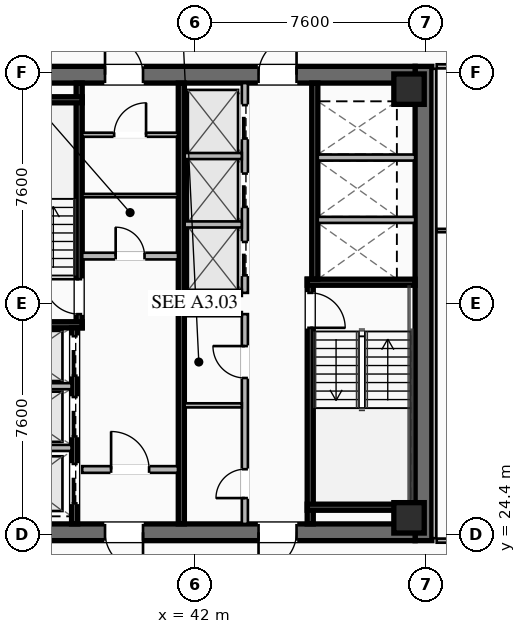
"""IFC4 building model, lengths in metres.
Left out: names, types, materials, properties, quantities, classifications, styles, units other than length and angle.
Written with IfcOpenShell. Run it as: python <this file> out.ifc"""

import sys

from ifc_helpers import new_model, si_unit, direction, frame, frame_2d, origin, origin_2d, place, context, subcontext, project, spatial, rectangle, hollow_rectangle, extrude, element, fill, save


model = new_model("IFC4")
c1 = context("Model", 3, precision=1e-05, world=origin(), true_north=direction((0.0, 1.0)))
c2 = subcontext(c1, "Body", "Model", "MODEL_VIEW")
j1 = project(units=[si_unit("LENGTHUNIT", "METRE"), si_unit("PLANEANGLEUNIT", "RADIAN")], contexts=[c1])
p1 = place(None, origin())
s1 = spatial("IfcSite", under=j1, at=p1, CompositionType="ELEMENT")
p2 = place(p1, origin())
s2 = spatial("IfcBuilding", under=s1, at=p2, CompositionType="ELEMENT")
p3 = place(p2, frame((0.0, 0.0, 171.2)))
s3 = spatial("IfcBuildingStorey", under=s2, at=p3, CompositionType="ELEMENT", Elevation=171.2)
p4 = place(p3, frame((49.525, 39.8, 0.0), z_axis=(0.0, 0.0, 1.0), x_axis=(0.0, -1.0, 0.0)))
e1 = element("IfcWall", 1, at=p4, inside=s3, PredefinedType="SHEAR", context=c2, shape_type="SweptSolid", body=[
    extrude(rectangle(XDim=15.6, YDim=0.55, at=frame_2d((7.8, 0.0))), origin(), (0.0, 0.0, 1.0), 3.55),
])
p5 = place(p3, frame((49.25, 24.475, 0.0), z_axis=(0.0, 0.0, 1.0), x_axis=(-1.0, 0.0, 0.0)))
e2 = element("IfcWall", 2, at=p5, inside=s3, PredefinedType="SHEAR", context=c2, shape_type="SweptSolid", body=[
    extrude(rectangle(XDim=14.5, YDim=0.55, at=frame_2d((7.25, 0.0))), origin(), (0.0, 0.0, 1.0), 3.55),
])
p6 = place(p5, frame((8.95, 0.0, 0.0)))
e3 = element("IfcOpeningElement", 3, at=p6, cuts=e2, PredefinedType="OPENING", context=c2, shape_type="SweptSolid", body=[
    extrude(rectangle(XDim=1.25, YDim=2.25, at=frame_2d((0.625, 1.125))), frame((0.0, 0.285, 0.0), z_axis=(0.0, -1.0, 0.0), x_axis=(1.0, 0.0, 0.0)), (0.0, 0.0, 1.0), 0.57),
])
p7 = place(p5, frame((3.9, 0.0, 0.0)))
e4 = element("IfcOpeningElement", 4, at=p7, cuts=e2, PredefinedType="OPENING", context=c2, shape_type="SweptSolid", body=[
    extrude(rectangle(XDim=1.25, YDim=2.25, at=frame_2d((0.625, 1.125))), frame((0.0, 0.285, 0.0), z_axis=(0.0, -1.0, 0.0), x_axis=(1.0, 0.0, 0.0)), (0.0, 0.0, 1.0), 0.57),
])
p8 = place(p3, frame((34.75, 39.525, 0.0), z_axis=(0.0, 0.0, 1.0), x_axis=(1.0, 0.0, 0.0)))
e5 = element("IfcWall", 5, at=p8, inside=s3, PredefinedType="SHEAR", context=c2, shape_type="SweptSolid", body=[
    extrude(rectangle(XDim=14.5, YDim=0.55, at=frame_2d((7.25, 0.0))), origin(), (0.0, 0.0, 1.0), 3.55),
])
p9 = place(p8, frame((4.3, 0.0, 0.0)))
e6 = element("IfcOpeningElement", 6, at=p9, cuts=e5, PredefinedType="OPENING", context=c2, shape_type="SweptSolid", body=[
    extrude(rectangle(XDim=1.25, YDim=2.25, at=frame_2d((0.625, 1.125))), frame((0.0, 0.285, 0.0), z_axis=(0.0, -1.0, 0.0), x_axis=(1.0, 0.0, 0.0)), (0.0, 0.0, 1.0), 0.57),
])
p10 = place(p8, frame((9.35, 0.0, 0.0)))
e7 = element("IfcOpeningElement", 7, at=p10, cuts=e5, PredefinedType="OPENING", context=c2, shape_type="SweptSolid", body=[
    extrude(rectangle(XDim=1.25, YDim=2.25, at=frame_2d((0.625, 1.125))), frame((0.0, 0.285, 0.0), z_axis=(0.0, -1.0, 0.0), x_axis=(1.0, 0.0, 0.0)), (0.0, 0.0, 1.0), 0.57),
])
for number, where, z_axis, x_axis in (
    (8, (49.05, 24.95, 0.0), (0.0, 0.0, 1.0), (1.0, 0.0, 0.0)),
    (9, (49.05, 39.05, 0.0), (0.0, 0.0, 1.0), (1.0, 0.0, 0.0)),
):
    element("IfcColumn", number, at=place(p3, frame(where, z_axis=z_axis, x_axis=x_axis)), inside=s3, PredefinedType="COLUMN", context=c2, shape_type="SweptSolid", body=[
        extrude(hollow_rectangle(XDim=1.0, YDim=1.0, WallThickness=0.04, at=origin_2d()), origin(), (0.0, 0.0, 1.0), 3.37),
    ])
p11 = place(p3, frame((38.2, 31.2, 0.0), z_axis=(0.0, 0.0, 1.0), x_axis=(0.0, 1.0, 0.0)))
e10 = element("IfcWall", 10, at=p11, inside=s3, PredefinedType="SHEAR", context=c2, shape_type="SweptSolid", body=[
    extrude(rectangle(XDim=8.05, YDim=0.2, at=frame_2d((4.025, 0.0))), origin(), (0.0, 0.0, 1.0), 3.37),
])
p12 = place(p11, frame((0.45, 0.0, 0.0)))
e11 = element("IfcOpeningElement", 11, at=p12, cuts=e10, PredefinedType="OPENING", context=c2, shape_type="SweptSolid", body=[
    extrude(rectangle(XDim=1.15, YDim=2.2, at=frame_2d((0.575, 1.1))), frame((0.0, 0.11, 0.0), z_axis=(0.0, -1.0, 0.0), x_axis=(1.0, 0.0, 0.0)), (0.0, 0.0, 1.0), 0.22),
])
for number, where, z_axis, x_axis in (
    (12, (34.75, 31.3, 0.0), (0.0, 0.0, 1.0), (1.0, 0.0, 0.0)),
    (13, (34.75, 38.7, 0.0), (0.0, 0.0, 1.0), (1.0, 0.0, 0.0)),
):
    element("IfcWall", number, at=place(p3, frame(where, z_axis=z_axis, x_axis=x_axis)), inside=s3, PredefinedType="SHEAR", context=c2, shape_type="SweptSolid", body=[
        extrude(rectangle(XDim=3.55, YDim=0.2, at=frame_2d((1.775, 0.0))), origin(), (0.0, 0.0, 1.0), 3.37),
    ])
p13 = place(p3, frame((45.8, 32.8, 0.0), z_axis=(0.0, 0.0, 1.0), x_axis=(0.0, -1.0, 0.0)))
e14 = element("IfcWall", 14, at=p13, inside=s3, PredefinedType="SHEAR", context=c2, shape_type="SweptSolid", body=[
    extrude(rectangle(XDim=8.05, YDim=0.2, at=frame_2d((4.025, 0.0))), origin(), (0.0, 0.0, 1.0), 3.37),
])
p14 = place(p13, frame((0.45, 0.0, 0.0)))
e15 = element("IfcOpeningElement", 15, at=p14, cuts=e14, PredefinedType="OPENING", context=c2, shape_type="SweptSolid", body=[
    extrude(rectangle(XDim=1.15, YDim=2.2, at=frame_2d((0.575, 1.1))), frame((0.0, 0.11, 0.0), z_axis=(0.0, -1.0, 0.0), x_axis=(1.0, 0.0, 0.0)), (0.0, 0.0, 1.0), 0.22),
])
for number, where, z_axis, x_axis in (
    (16, (45.7, 32.7, 0.0), (0.0, 0.0, 1.0), (1.0, 0.0, 0.0)),
    (17, (45.7, 25.3, 0.0), (0.0, 0.0, 1.0), (1.0, 0.0, 0.0)),
):
    element("IfcWall", number, at=place(p3, frame(where, z_axis=z_axis, x_axis=x_axis)), inside=s3, PredefinedType="SHEAR", context=c2, shape_type="SweptSolid", body=[
        extrude(rectangle(XDim=3.55, YDim=0.2, at=frame_2d((1.775, 0.0))), origin(), (0.0, 0.0, 1.0), 3.37),
    ])
p15 = place(p3, frame((41.56, 24.75, 0.0), z_axis=(0.0, 0.0, 1.0), x_axis=(0.0, 1.0, 0.0)))
e18 = element("IfcWall", 18, at=p15, inside=s3, PredefinedType="SHEAR", context=c2, shape_type="SweptSolid", body=[
    extrude(rectangle(XDim=14.5, YDim=0.2, at=frame_2d((7.25, 0.0))), origin(), (0.0, 0.0, 1.0), 3.37),
])
p16 = place(p3, frame((38.3, 33.56, 0.0), z_axis=(0.0, 0.0, 1.0), x_axis=(1.0, 0.0, 0.0)))
e19 = element("IfcWall", 19, at=p16, inside=s3, PredefinedType="SOLIDWALL", context=c2, shape_type="SweptSolid", body=[
    extrude(rectangle(XDim=3.15, YDim=0.22, at=frame_2d((1.575, 0.0))), origin(), (0.0, 0.0, 1.0), 2.723),
])
p17 = place(p16, frame((1.1, 0.0, 0.0)))
e20 = element("IfcOpeningElement", 20, at=p17, cuts=e19, PredefinedType="OPENING", context=c2, shape_type="SweptSolid", body=[
    extrude(rectangle(XDim=0.95, YDim=2.05, at=frame_2d((0.475, 1.025))), frame((0.0, 0.12, 0.0), z_axis=(0.0, -1.0, 0.0), x_axis=(1.0, 0.0, 0.0)), (0.0, 0.0, 1.0), 0.24),
])
p18 = place(p3, frame((38.3, 26.54, 0.0), z_axis=(0.0, 0.0, 1.0), x_axis=(1.0, 0.0, 0.0)))
e21 = element("IfcWall", 21, at=p18, inside=s3, PredefinedType="SOLIDWALL", context=c2, shape_type="SweptSolid", body=[
    extrude(rectangle(XDim=3.15, YDim=0.22, at=frame_2d((1.575, 0.0))), origin(), (0.0, 0.0, 1.0), 2.723),
])
p19 = place(p18, frame((0.95, 0.0, 0.0)))
e22 = element("IfcOpeningElement", 22, at=p19, cuts=e21, PredefinedType="OPENING", context=c2, shape_type="SweptSolid", body=[
    extrude(rectangle(XDim=1.25, YDim=2.25, at=frame_2d((0.625, 1.125))), frame((0.0, 0.12, 0.0), z_axis=(0.0, -1.0, 0.0), x_axis=(1.0, 0.0, 0.0)), (0.0, 0.0, 1.0), 0.24),
])
p20 = place(p3, frame((38.05, 24.75, 0.0), z_axis=(0.0, 0.0, 1.0), x_axis=(0.0, 1.0, 0.0)))
e23 = element("IfcWall", 23, at=p20, inside=s3, PredefinedType="SHEAR", context=c2, shape_type="SweptSolid", body=[
    extrude(rectangle(XDim=6.45, YDim=0.2, at=frame_2d((3.225, 0.0))), origin(), (0.0, 0.0, 1.0), 3.37),
])
p21 = place(p20, frame((4.875, 0.0, 0.0)))
e24 = element("IfcOpeningElement", 24, at=p21, cuts=e23, PredefinedType="OPENING", context=c2, shape_type="SweptSolid", body=[
    extrude(rectangle(XDim=1.3, YDim=2.25, at=frame_2d((0.65, 1.125))), frame((0.0, 0.11, 0.0), z_axis=(0.0, -1.0, 0.0), x_axis=(1.0, 0.0, 0.0)), (0.0, 0.0, 1.0), 0.22),
])
p22 = place(p20, frame((2.875, 0.0, 0.0)))
e25 = element("IfcOpeningElement", 25, at=p22, cuts=e23, PredefinedType="OPENING", context=c2, shape_type="SweptSolid", body=[
    extrude(rectangle(XDim=1.3, YDim=2.25, at=frame_2d((0.65, 1.125))), frame((0.0, 0.11, 0.0), z_axis=(0.0, -1.0, 0.0), x_axis=(1.0, 0.0, 0.0)), (0.0, 0.0, 1.0), 0.22),
])
p23 = place(p20, frame((0.675, 0.0, 0.0)))
e26 = element("IfcOpeningElement", 26, at=p23, cuts=e23, PredefinedType="OPENING", context=c2, shape_type="SweptSolid", body=[
    extrude(rectangle(XDim=1.3, YDim=2.25, at=frame_2d((0.65, 1.125))), frame((0.0, 0.11, 0.0), z_axis=(0.0, -1.0, 0.0), x_axis=(1.0, 0.0, 0.0)), (0.0, 0.0, 1.0), 0.22),
])
for number, where, z_axis, x_axis in (
    (27, (34.75, 27.25, 0.0), (0.0, 0.0, 1.0), (1.0, 0.0, 0.0)),
    (28, (34.75, 29.28, 0.0), (0.0, 0.0, 1.0), (1.0, 0.0, 0.0)),
):
    element("IfcWall", number, at=place(p3, frame(where, z_axis=z_axis, x_axis=x_axis)), inside=s3, PredefinedType="SOLIDWALL", context=c2, shape_type="SweptSolid", body=[
        extrude(rectangle(XDim=3.2, YDim=0.2, at=frame_2d((1.6, 0.0))), origin(), (0.0, 0.0, 1.0), 3.37),
    ])
p24 = place(p3, frame((45.95, 39.25, 0.0), z_axis=(0.0, 0.0, 1.0), x_axis=(0.0, -1.0, 0.0)))
e29 = element("IfcWall", 29, at=p24, inside=s3, PredefinedType="SHEAR", context=c2, shape_type="SweptSolid", body=[
    extrude(rectangle(XDim=6.45, YDim=0.2, at=frame_2d((3.225, 0.0))), origin(), (0.0, 0.0, 1.0), 3.37),
])
for number, where, z_axis, x_axis in (
    (30, (46.05, 34.75, 0.0), (0.0, 0.0, 1.0), (1.0, 0.0, 0.0)),
    (31, (46.05, 36.8, 0.0), (0.0, 0.0, 1.0), (1.0, 0.0, 0.0)),
):
    element("IfcWall", number, at=place(p3, frame(where, z_axis=z_axis, x_axis=x_axis)), inside=s3, PredefinedType="SOLIDWALL", context=c2, shape_type="SweptSolid", body=[
        extrude(rectangle(XDim=3.2, YDim=0.2, at=frame_2d((1.6, 0.0))), origin(), (0.0, 0.0, 1.0), 3.37),
    ])
p25 = place(p3, frame((38.3, 37.55, 0.0), z_axis=(0.0, 0.0, 1.0), x_axis=(1.0, 0.0, 0.0)))
e32 = element("IfcWall", 32, at=p25, inside=s3, PredefinedType="PARTITIONING", context=c2, shape_type="SweptSolid", body=[
    extrude(rectangle(XDim=3.15, YDim=0.135, at=frame_2d((1.575, 0.0))), origin(), (0.0, 0.0, 1.0), 2.723),
])
p26 = place(p25, frame((1.05, 0.0, 0.0)))
e33 = element("IfcOpeningElement", 33, at=p26, cuts=e32, PredefinedType="OPENING", context=c2, shape_type="SweptSolid", body=[
    extrude(rectangle(XDim=1.05, YDim=2.2, at=frame_2d((0.525, 1.1))), frame((0.0, 0.077, 0.0), z_axis=(0.0, -1.0, 0.0), x_axis=(1.0, 0.0, 0.0)), (0.0, 0.0, 1.0), 0.155),
])
p27 = place(p3, frame((38.3, 35.55, 0.0), z_axis=(0.0, 0.0, 1.0), x_axis=(1.0, 0.0, 0.0)))
e34 = element("IfcWall", 34, at=p27, inside=s3, PredefinedType="PARTITIONING", context=c2, shape_type="SweptSolid", body=[
    extrude(rectangle(XDim=3.15, YDim=0.11, at=frame_2d((1.575, 0.0))), origin(), (0.0, 0.0, 1.0), 2.723),
])
p28 = place(p3, frame((43.65, 24.75, 0.0), z_axis=(0.0, 0.0, 1.0), x_axis=(0.0, 1.0, 0.0)))
e35 = element("IfcWall", 35, at=p28, inside=s3, PredefinedType="SOLIDWALL", context=c2, shape_type="SweptSolid", body=[
    extrude(rectangle(XDim=6.9, YDim=0.2, at=frame_2d((3.45, 0.0))), origin(), (0.0, 0.0, 1.0), 2.723),
])
p29 = place(p28, frame((0.85, 0.0, 0.0)))
e36 = element("IfcOpeningElement", 36, at=p29, cuts=e35, PredefinedType="OPENING", context=c2, shape_type="SweptSolid", body=[
    extrude(rectangle(XDim=0.95, YDim=2.05, at=frame_2d((0.475, 1.025))), frame((0.0, 0.11, 0.0), z_axis=(0.0, -1.0, 0.0), x_axis=(1.0, 0.0, 0.0)), (0.0, 0.0, 1.0), 0.22),
])
p30 = place(p28, frame((4.8, 0.0, 0.0)))
e37 = element("IfcOpeningElement", 37, at=p30, cuts=e35, PredefinedType="OPENING", context=c2, shape_type="SweptSolid", body=[
    extrude(rectangle(XDim=1.05, YDim=2.2, at=frame_2d((0.525, 1.1))), frame((0.0, 0.11, 0.0), z_axis=(0.0, -1.0, 0.0), x_axis=(1.0, 0.0, 0.0)), (0.0, 0.0, 1.0), 0.22),
])
for number, where, z_axis, x_axis in (
    (38, (41.67, 31.65, 0.0), (0.0, 0.0, 1.0), (1.0, 0.0, 0.0)),
    (39, (41.67, 28.65, 0.0), (0.0, 0.0, 1.0), (1.0, 0.0, 0.0)),
):
    element("IfcWall", number, at=place(p3, frame(where, z_axis=z_axis, x_axis=x_axis)), inside=s3, PredefinedType="PARTITIONING", context=c2, shape_type="SweptSolid", body=[
        extrude(rectangle(XDim=1.88, YDim=0.135, at=frame_2d((0.94, 0.0))), origin(), (0.0, 0.0, 1.0), 2.723),
    ])
p31 = place(p3, frame((43.65, 32.35, 0.0), z_axis=(0.0, 0.0, 1.0), x_axis=(0.0, 1.0, 0.0)))
e40 = element("IfcWall", 40, at=p31, inside=s3, PredefinedType="SOLIDWALL", context=c2, shape_type="SweptSolid", body=[
    extrude(rectangle(XDim=6.9, YDim=0.2, at=frame_2d((3.45, 0.0))), origin(), (0.0, 0.0, 1.0), 3.37),
])
p32 = place(p31, frame((0.575, 0.0, 0.0)))
e41 = element("IfcOpeningElement", 41, at=p32, cuts=e40, PredefinedType="OPENING", context=c2, shape_type="SweptSolid", body=[
    extrude(rectangle(XDim=1.1, YDim=2.2, at=frame_2d((0.55, 1.1))), frame((0.0, 0.11, 0.0), z_axis=(0.0, -1.0, 0.0), x_axis=(1.0, 0.0, 0.0)), (0.0, 0.0, 1.0), 0.22),
])
p33 = place(p31, frame((2.825, 0.0, 0.0)))
e42 = element("IfcOpeningElement", 42, at=p33, cuts=e40, PredefinedType="OPENING", context=c2, shape_type="SweptSolid", body=[
    extrude(rectangle(XDim=1.1, YDim=2.2, at=frame_2d((0.55, 1.1))), frame((0.0, 0.11, 0.0), z_axis=(0.0, -1.0, 0.0), x_axis=(1.0, 0.0, 0.0)), (0.0, 0.0, 1.0), 0.22),
])
p34 = place(p31, frame((5.075, 0.0, 0.0)))
e43 = element("IfcOpeningElement", 43, at=p34, cuts=e40, PredefinedType="OPENING", context=c2, shape_type="SweptSolid", body=[
    extrude(rectangle(XDim=1.1, YDim=2.2, at=frame_2d((0.55, 1.1))), frame((0.0, 0.11, 0.0), z_axis=(0.0, -1.0, 0.0), x_axis=(1.0, 0.0, 0.0)), (0.0, 0.0, 1.0), 0.22),
])
for number, where, z_axis, x_axis in (
    (44, (41.67, 32.35, 0.0), (0.0, 0.0, 1.0), (1.0, 0.0, 0.0)),
    (45, (41.67, 34.6, 0.0), (0.0, 0.0, 1.0), (1.0, 0.0, 0.0)),
    (46, (41.67, 36.85, 0.0), (0.0, 0.0, 1.0), (1.0, 0.0, 0.0)),
):
    element("IfcWall", number, at=place(p3, frame(where, z_axis=z_axis, x_axis=x_axis)), inside=s3, PredefinedType="SOLIDWALL", context=c2, shape_type="SweptSolid", body=[
        extrude(rectangle(XDim=1.88, YDim=0.2, at=frame_2d((0.94, 0.0))), origin(), (0.0, 0.0, 1.0), 3.37),
    ])
p35 = place(p3, frame((49.88, 39.72, 0.0), z_axis=(0.0, 0.0, 1.0), x_axis=(0.0, -1.0, 0.0)))
e47 = element("IfcWall", 47, at=p35, inside=s3, PredefinedType="PARTITIONING", context=c2, shape_type="SweptSolid", body=[
    extrude(rectangle(XDim=15.44, YDim=0.135, at=frame_2d((7.72, 0.0))), origin(), (0.0, 0.0, 1.0), 2.723),
])
p36 = place(p3, frame((59.53, 39.8, 0.0), z_axis=(0.0, 0.0, 1.0), x_axis=(-1.0, 0.0, 0.0)))
e48 = element("IfcWall", 48, at=p36, inside=s3, PredefinedType="PARTITIONING", context=c2, shape_type="SweptSolid", body=[
    extrude(rectangle(XDim=9.57, YDim=0.135, at=frame_2d((4.785, 0.0))), origin(), (0.0, 0.0, 1.0), 2.723),
])
p37 = place(p36, frame((8.13, 0.0, 0.0)))
e49 = element("IfcOpeningElement", 49, at=p37, cuts=e48, PredefinedType="OPENING", context=c2, shape_type="SweptSolid", body=[
    extrude(rectangle(XDim=0.95, YDim=2.05, at=frame_2d((0.475, 1.025))), frame((0.0, 0.077, 0.0), z_axis=(0.0, -1.0, 0.0), x_axis=(1.0, 0.0, 0.0)), (0.0, 0.0, 1.0), 0.155),
])
p38 = place(p3, frame((49.96, 24.2, 0.0), z_axis=(0.0, 0.0, 1.0), x_axis=(1.0, 0.0, 0.0)))
e50 = element("IfcWall", 50, at=p38, inside=s3, PredefinedType="PARTITIONING", context=c2, shape_type="SweptSolid", body=[
    extrude(rectangle(XDim=9.57, YDim=0.135, at=frame_2d((4.785, 0.0))), origin(), (0.0, 0.0, 1.0), 2.723),
])
p39 = place(p38, frame((0.5, 0.0, 0.0)))
e51 = element("IfcOpeningElement", 51, at=p39, cuts=e50, PredefinedType="OPENING", context=c2, shape_type="SweptSolid", body=[
    extrude(rectangle(XDim=0.95, YDim=2.05, at=frame_2d((0.475, 1.025))), frame((0.0, 0.077, 0.0), z_axis=(0.0, -1.0, 0.0), x_axis=(1.0, 0.0, 0.0)), (0.0, 0.0, 1.0), 0.155),
])
p40 = place(p3, frame((49.96, 34.4, 0.0), z_axis=(0.0, 0.0, 1.0), x_axis=(1.0, 0.0, 0.0)))
e52 = element("IfcWall", 52, at=p40, inside=s3, PredefinedType="PARTITIONING", context=c2, shape_type="SweptSolid", body=[
    extrude(rectangle(XDim=9.57, YDim=0.11, at=frame_2d((4.785, 0.0))), origin(), (0.0, 0.0, 1.0), 2.723),
])
p41 = place(p9, origin())
e53 = element("IfcDoor", 53, at=p41, inside=s3, OperationType="SINGLE_SWING_LEFT", PredefinedType="DOOR", context=c2, shape_type="SweptSolid", body=[
    extrude(rectangle(XDim=1.25, YDim=2.25, at=frame_2d((0.625, 1.125))), frame((0.0, 0.025, 0.0), z_axis=(0.0, -1.0, 0.0), x_axis=(1.0, 0.0, 0.0)), (0.0, 0.0, 1.0), 0.05),
])
fill(e6, e53)
p42 = place(p10, origin())
e54 = element("IfcDoor", 54, at=p42, inside=s3, OperationType="SINGLE_SWING_RIGHT", PredefinedType="DOOR", context=c2, shape_type="SweptSolid", body=[
    extrude(rectangle(XDim=1.25, YDim=2.25, at=frame_2d((0.625, 1.125))), frame((0.0, 0.025, 0.0), z_axis=(0.0, -1.0, 0.0), x_axis=(1.0, 0.0, 0.0)), (0.0, 0.0, 1.0), 0.05),
])
fill(e7, e54)
p43 = place(p6, origin())
e55 = element("IfcDoor", 55, at=p43, inside=s3, OperationType="SINGLE_SWING_LEFT", PredefinedType="DOOR", context=c2, shape_type="SweptSolid", body=[
    extrude(rectangle(XDim=1.25, YDim=2.25, at=frame_2d((0.625, 1.125))), frame((0.0, 0.025, 0.0), z_axis=(0.0, -1.0, 0.0), x_axis=(1.0, 0.0, 0.0)), (0.0, 0.0, 1.0), 0.05),
])
fill(e3, e55)
p44 = place(p7, origin())
e56 = element("IfcDoor", 56, at=p44, inside=s3, OperationType="SINGLE_SWING_RIGHT", PredefinedType="DOOR", context=c2, shape_type="SweptSolid", body=[
    extrude(rectangle(XDim=1.25, YDim=2.25, at=frame_2d((0.625, 1.125))), frame((0.0, 0.025, 0.0), z_axis=(0.0, -1.0, 0.0), x_axis=(1.0, 0.0, 0.0)), (0.0, 0.0, 1.0), 0.05),
])
fill(e4, e56)
p45 = place(p12, origin())
e57 = element("IfcDoor", 57, at=p45, inside=s3, OperationType="SINGLE_SWING_RIGHT", PredefinedType="DOOR", context=c2, shape_type="SweptSolid", body=[
    extrude(rectangle(XDim=1.15, YDim=2.2, at=frame_2d((0.575, 1.1))), frame((0.0, 0.025, 0.0), z_axis=(0.0, -1.0, 0.0), x_axis=(1.0, 0.0, 0.0)), (0.0, 0.0, 1.0), 0.05),
])
fill(e11, e57)
p46 = place(p14, origin())
e58 = element("IfcDoor", 58, at=p46, inside=s3, OperationType="SINGLE_SWING_RIGHT", PredefinedType="DOOR", context=c2, shape_type="SweptSolid", body=[
    extrude(rectangle(XDim=1.15, YDim=2.2, at=frame_2d((0.575, 1.1))), frame((0.0, 0.025, 0.0), z_axis=(0.0, -1.0, 0.0), x_axis=(1.0, 0.0, 0.0)), (0.0, 0.0, 1.0), 0.05),
])
fill(e15, e58)
p47 = place(p19, origin())
e59 = element("IfcDoor", 59, at=p47, inside=s3, OperationType="SINGLE_SWING_LEFT", PredefinedType="DOOR", context=c2, shape_type="SweptSolid", body=[
    extrude(rectangle(XDim=1.25, YDim=2.25, at=frame_2d((0.625, 1.125))), frame((0.0, 0.025, 0.0), z_axis=(0.0, -1.0, 0.0), x_axis=(1.0, 0.0, 0.0)), (0.0, 0.0, 1.0), 0.05),
])
fill(e22, e59)
p48 = place(p26, origin())
e60 = element("IfcDoor", 60, at=p48, inside=s3, OperationType="SINGLE_SWING_RIGHT", PredefinedType="DOOR", context=c2, shape_type="SweptSolid", body=[
    extrude(rectangle(XDim=1.05, YDim=2.2, at=frame_2d((0.525, 1.1))), frame((0.0, 0.025, 0.0), z_axis=(0.0, -1.0, 0.0), x_axis=(1.0, 0.0, 0.0)), (0.0, 0.0, 1.0), 0.05),
])
fill(e33, e60)
p49 = place(p17, origin())
e61 = element("IfcDoor", 61, at=p49, inside=s3, OperationType="SINGLE_SWING_LEFT", PredefinedType="DOOR", context=c2, shape_type="SweptSolid", body=[
    extrude(rectangle(XDim=0.95, YDim=2.05, at=frame_2d((0.475, 1.025))), frame((0.0, 0.025, 0.0), z_axis=(0.0, -1.0, 0.0), x_axis=(1.0, 0.0, 0.0)), (0.0, 0.0, 1.0), 0.05),
])
fill(e20, e61)
p50 = place(p29, origin())
e62 = element("IfcDoor", 62, at=p50, inside=s3, OperationType="SINGLE_SWING_LEFT", PredefinedType="DOOR", context=c2, shape_type="SweptSolid", body=[
    extrude(rectangle(XDim=0.95, YDim=2.05, at=frame_2d((0.475, 1.025))), frame((0.0, 0.025, 0.0), z_axis=(0.0, -1.0, 0.0), x_axis=(1.0, 0.0, 0.0)), (0.0, 0.0, 1.0), 0.05),
])
fill(e36, e62)
p51 = place(p30, origin())
e63 = element("IfcDoor", 63, at=p51, inside=s3, OperationType="SINGLE_SWING_RIGHT", PredefinedType="DOOR", context=c2, shape_type="SweptSolid", body=[
    extrude(rectangle(XDim=1.05, YDim=2.2, at=frame_2d((0.525, 1.1))), frame((0.0, 0.025, 0.0), z_axis=(0.0, -1.0, 0.0), x_axis=(1.0, 0.0, 0.0)), (0.0, 0.0, 1.0), 0.05),
])
fill(e37, e63)
p52 = place(p21, origin())
e64 = element("IfcDoor", 64, at=p52, inside=s3, OperationType="SLIDING_TO_LEFT", PredefinedType="DOOR", context=c2, shape_type="SweptSolid", body=[
    extrude(rectangle(XDim=1.3, YDim=2.25, at=frame_2d((0.65, 1.125))), frame((0.0, 0.025, 0.0), z_axis=(0.0, -1.0, 0.0), x_axis=(1.0, 0.0, 0.0)), (0.0, 0.0, 1.0), 0.05),
])
fill(e24, e64)
p53 = place(p22, origin())
e65 = element("IfcDoor", 65, at=p53, inside=s3, OperationType="SLIDING_TO_LEFT", PredefinedType="DOOR", context=c2, shape_type="SweptSolid", body=[
    extrude(rectangle(XDim=1.3, YDim=2.25, at=frame_2d((0.65, 1.125))), frame((0.0, 0.025, 0.0), z_axis=(0.0, -1.0, 0.0), x_axis=(1.0, 0.0, 0.0)), (0.0, 0.0, 1.0), 0.05),
])
fill(e25, e65)
p54 = place(p23, origin())
e66 = element("IfcDoor", 66, at=p54, inside=s3, OperationType="SLIDING_TO_LEFT", PredefinedType="DOOR", context=c2, shape_type="SweptSolid", body=[
    extrude(rectangle(XDim=1.3, YDim=2.25, at=frame_2d((0.65, 1.125))), frame((0.0, 0.025, 0.0), z_axis=(0.0, -1.0, 0.0), x_axis=(1.0, 0.0, 0.0)), (0.0, 0.0, 1.0), 0.05),
])
fill(e26, e66)
p55 = place(p32, origin())
e67 = element("IfcDoor", 67, at=p55, inside=s3, OperationType="SLIDING_TO_LEFT", PredefinedType="DOOR", context=c2, shape_type="SweptSolid", body=[
    extrude(rectangle(XDim=1.1, YDim=2.2, at=frame_2d((0.55, 1.1))), frame((0.0, 0.025, 0.0), z_axis=(0.0, -1.0, 0.0), x_axis=(1.0, 0.0, 0.0)), (0.0, 0.0, 1.0), 0.05),
])
fill(e41, e67)
p56 = place(p33, origin())
e68 = element("IfcDoor", 68, at=p56, inside=s3, OperationType="SLIDING_TO_LEFT", PredefinedType="DOOR", context=c2, shape_type="SweptSolid", body=[
    extrude(rectangle(XDim=1.1, YDim=2.2, at=frame_2d((0.55, 1.1))), frame((0.0, 0.025, 0.0), z_axis=(0.0, -1.0, 0.0), x_axis=(1.0, 0.0, 0.0)), (0.0, 0.0, 1.0), 0.05),
])
fill(e42, e68)
p57 = place(p34, origin())
e69 = element("IfcDoor", 69, at=p57, inside=s3, OperationType="SLIDING_TO_LEFT", PredefinedType="DOOR", context=c2, shape_type="SweptSolid", body=[
    extrude(rectangle(XDim=1.1, YDim=2.2, at=frame_2d((0.55, 1.1))), frame((0.0, 0.025, 0.0), z_axis=(0.0, -1.0, 0.0), x_axis=(1.0, 0.0, 0.0)), (0.0, 0.0, 1.0), 0.05),
])
fill(e43, e69)
save(model, sys.argv[1])
